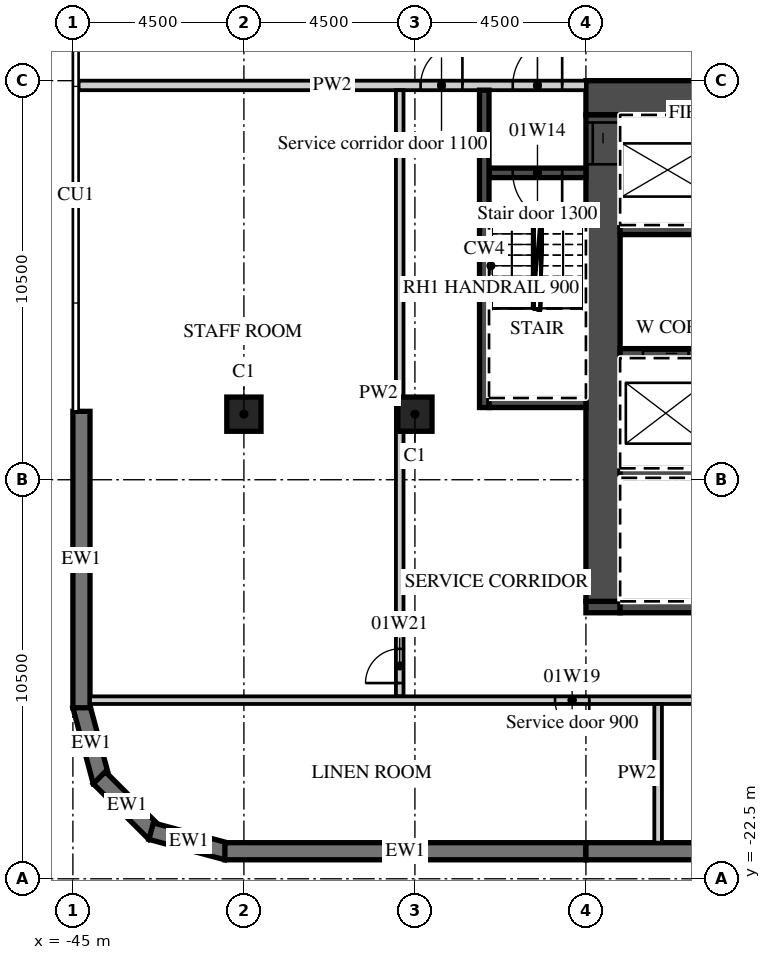
"""IFC4 building model, lengths in metres.
Left out: names, types, materials, properties, quantities, classifications, styles, units other than length and angle.
Written with IfcOpenShell. Run it as: python <this file> out.ifc"""

import sys

from ifc_helpers import new_model, si_unit, direction, frame, frame_2d, origin, origin_2d, place, context, subcontext, project, spatial, polyline, rectangle, outline, extrude, element, fill, save


model = new_model("IFC4")
c1 = context("Model", 3, precision=1e-05, world=origin(), true_north=direction((0.0, 1.0)))
c2 = subcontext(c1, "Body", "Model", "MODEL_VIEW")
j1 = project(units=[si_unit("LENGTHUNIT", "METRE"), si_unit("PLANEANGLEUNIT", "RADIAN")], contexts=[c1])
p1 = place(None, origin())
s1 = spatial("IfcSite", under=j1, at=p1, CompositionType="ELEMENT")
p2 = place(p1, origin())
s2 = spatial("IfcBuilding", under=s1, at=p2, CompositionType="ELEMENT")
p3 = place(p2, frame((0.0, 0.0, 11.0)))
s3 = spatial("IfcBuildingStorey", under=s2, at=p3, CompositionType="ELEMENT", Elevation=11.0)
for number, where, z_axis, x_axis in (
    (1, (-40.5, -10.275, 0.0), (0.0, 0.0, 1.0), (1.0, 0.0, 0.0)),
    (2, (-36.0, -10.275, 0.0), (0.0, 0.0, 1.0), (1.0, 0.0, 0.0)),
):
    element("IfcColumn", number, at=place(p3, frame(where, z_axis=z_axis, x_axis=x_axis)), inside=s3, PredefinedType="COLUMN", context=c2, shape_type="SweptSolid", body=[
        extrude(rectangle(XDim=0.9, YDim=0.9, at=origin_2d()), origin(), (0.0, 0.0, 1.0), 6.0),
    ])
p4 = place(p3, frame((-44.783, -17.942, 0.0), z_axis=(0.0, 0.0, 1.0), x_axis=(0.25881466832, -0.965926999034, 0.0)))
e3 = element("IfcWall", 3, at=p4, inside=s3, PredefinedType="SOLIDWALL", context=c2, shape_type="SweptSolid", body=[
    extrude(outline(polyline([(0.0, -0.225), (2.071, -0.225), (1.95, 0.225), (0.121, 0.225), (0.0, -0.225)])), origin(), (0.0, 0.0, 1.0), 5.55),
])
p5 = place(p3, frame((-44.305, -19.841, 0.0), z_axis=(0.0, 0.0, 1.0), x_axis=(0.707106781187, -0.707106781187, 0.0)))
e4 = element("IfcWall", 4, at=p5, inside=s3, PredefinedType="SOLIDWALL", context=c2, shape_type="SweptSolid", body=[
    extrude(outline(polyline([(0.0, -0.225), (2.071, -0.225), (1.95, 0.225), (0.121, 0.225), (0.0, -0.225)])), origin(), (0.0, 0.0, 1.0), 5.55),
])
p6 = place(p3, frame((-42.942, -21.247, 0.0), z_axis=(0.0, 0.0, 1.0), x_axis=(0.965926999034, -0.25881466832, 0.0)))
e5 = element("IfcWall", 5, at=p6, inside=s3, PredefinedType="SOLIDWALL", context=c2, shape_type="SweptSolid", body=[
    extrude(outline(polyline([(-0.0, -0.225), (2.07, -0.225), (1.95, 0.225), (0.12, 0.225), (-0.0, -0.225)])), origin(), (0.0, 0.0, 1.0), 5.55),
])
p7 = place(p3, frame((-41.0, -21.775, 0.0), z_axis=(0.0, 0.0, 1.0), x_axis=(1.0, 0.0, 0.0)))
e6 = element("IfcWall", 6, at=p7, inside=s3, PredefinedType="SOLIDWALL", context=c2, shape_type="SweptSolid", body=[
    extrude(rectangle(XDim=9.5, YDim=0.45, at=frame_2d((4.75, 0.0))), origin(), (0.0, 0.0, 1.0), 5.55),
])
p8 = place(p3, frame((-31.5, -21.775, 0.0), z_axis=(0.0, 0.0, 1.0), x_axis=(1.0, 0.0, 0.0)))
e7 = element("IfcWall", 7, at=p8, inside=s3, PredefinedType="SOLIDWALL", context=c2, shape_type="SweptSolid", body=[
    extrude(rectangle(XDim=18.0, YDim=0.45, at=frame_2d((9.0, 0.0))), origin(), (0.0, 0.0, 1.0), 5.55),
])
p9 = place(p3, frame((-44.775, -10.2, 0.0), z_axis=(0.0, 0.0, 1.0), x_axis=(0.0, -1.0, 0.0)))
e8 = element("IfcWall", 8, at=p9, inside=s3, PredefinedType="SOLIDWALL", context=c2, shape_type="SweptSolid", body=[
    extrude(rectangle(XDim=7.8, YDim=0.45, at=frame_2d((3.9, 0.0))), origin(), (0.0, 0.0, 1.0), 5.55),
])
p10 = place(p3, frame((-31.5, -1.95, 0.0), z_axis=(0.0, 0.0, 1.0), x_axis=(1.0, 0.0, 0.0)))
e9 = element("IfcWall", 9, at=p10, inside=s3, PredefinedType="SHEAR", context=c2, shape_type="SweptSolid", body=[
    extrude(rectangle(XDim=18.0, YDim=0.9, at=frame_2d((9.0, 0.0))), origin(), (0.0, 0.0, 1.0), 5.55),
])
p11 = place(p10, frame((14.725, 0.0, 0.0)))
e10 = element("IfcOpeningElement", 10, at=p11, cuts=e9, PredefinedType="OPENING", context=c2, shape_type="SweptSolid", body=[
    extrude(rectangle(XDim=1.8, YDim=2.1, at=frame_2d((0.9, 1.05))), frame((0.0, 0.46, 0.0), z_axis=(0.0, -1.0, 0.0), x_axis=(1.0, 0.0, 0.0)), (0.0, 0.0, 1.0), 0.92),
])
p12 = place(p3, frame((-31.5, -15.35, 0.0), z_axis=(0.0, 0.0, 1.0), x_axis=(1.0, 0.0, 0.0)))
e11 = element("IfcWall", 11, at=p12, inside=s3, PredefinedType="SHEAR", context=c2, shape_type="SweptSolid", body=[
    extrude(rectangle(XDim=0.9, YDim=0.3, at=frame_2d((0.45, 0.0))), origin(), (0.0, 0.0, 1.0), 5.55),
])
p13 = place(p3, frame((-30.6, -15.35, 0.0), z_axis=(0.0, 0.0, 1.0), x_axis=(1.0, 0.0, 0.0)))
e12 = element("IfcWall", 12, at=p13, inside=s3, PredefinedType="SHEAR", context=c2, shape_type="SweptSolid", body=[
    extrude(rectangle(XDim=10.3, YDim=0.3, at=frame_2d((5.15, 0.0))), origin(), (0.0, 0.0, 1.0), 5.55),
])
p14 = place(p13, frame((5.0, 0.0, 0.0)))
e13 = element("IfcOpeningElement", 13, at=p14, cuts=e12, PredefinedType="OPENING", context=c2, shape_type="SweptSolid", body=[
    extrude(rectangle(XDim=1.3, YDim=2.1, at=frame_2d((0.65, 1.05))), frame((0.0, 0.16, 0.0), z_axis=(0.0, -1.0, 0.0), x_axis=(1.0, 0.0, 0.0)), (0.0, 0.0, 1.0), 0.32),
])
p15 = place(p13, frame((7.9, 0.0, 0.0)))
e14 = element("IfcOpeningElement", 14, at=p15, cuts=e12, PredefinedType="OPENING", context=c2, shape_type="SweptSolid", body=[
    extrude(rectangle(XDim=0.9, YDim=2.1, at=frame_2d((0.45, 1.05))), frame((0.0, 0.16, 0.0), z_axis=(0.0, -1.0, 0.0), x_axis=(1.0, 0.0, 0.0)), (0.0, 0.0, 1.0), 0.32),
])
p16 = place(p3, frame((-31.05, -15.2, 0.0), z_axis=(0.0, 0.0, 1.0), x_axis=(0.0, 1.0, 0.0)))
e15 = element("IfcWall", 15, at=p16, inside=s3, PredefinedType="SHEAR", context=c2, shape_type="SweptSolid", body=[
    extrude(rectangle(XDim=12.8, YDim=0.9, at=frame_2d((6.4, 0.0))), origin(), (0.0, 0.0, 1.0), 5.55),
])
p17 = place(p16, frame((11.5, 0.0, 0.0)))
e16 = element("IfcOpeningElement", 16, at=p17, cuts=e15, PredefinedType="OPENING", context=c2, shape_type="SweptSolid", body=[
    extrude(rectangle(XDim=1.1, YDim=2.1, at=frame_2d((0.55, 1.05))), frame((0.0, 0.46, 0.0), z_axis=(0.0, -1.0, 0.0), x_axis=(1.0, 0.0, 0.0)), (0.0, 0.0, 1.0), 0.92),
])
p18 = place(p3, frame((-30.6, -5.425, 0.0), z_axis=(0.0, 0.0, 1.0), x_axis=(1.0, 0.0, 0.0)))
e17 = element("IfcWall", 17, at=p18, inside=s3, PredefinedType="SHEAR", context=c2, shape_type="SweptSolid", body=[
    extrude(rectangle(XDim=13.0, YDim=0.25, at=frame_2d((6.5, 0.0))), origin(), (0.0, 0.0, 1.0), 5.55),
])
p19 = place(p18, frame((3.325, 0.0, 0.0)))
e18 = element("IfcOpeningElement", 18, at=p19, cuts=e17, PredefinedType="OPENING", context=c2, shape_type="SweptSolid", body=[
    extrude(rectangle(XDim=1.2, YDim=2.1, at=frame_2d((0.6, 1.05))), frame((0.0, 0.135, 0.0), z_axis=(0.0, -1.0, 0.0), x_axis=(1.0, 0.0, 0.0)), (0.0, 0.0, 1.0), 0.27),
])
p20 = place(p18, frame((5.925, 0.0, 0.0)))
e19 = element("IfcOpeningElement", 19, at=p20, cuts=e17, PredefinedType="OPENING", context=c2, shape_type="SweptSolid", body=[
    extrude(rectangle(XDim=1.2, YDim=2.1, at=frame_2d((0.6, 1.05))), frame((0.0, 0.135, 0.0), z_axis=(0.0, -1.0, 0.0), x_axis=(1.0, 0.0, 0.0)), (0.0, 0.0, 1.0), 0.27),
])
p21 = place(p18, frame((8.525, 0.0, 0.0)))
e20 = element("IfcOpeningElement", 20, at=p21, cuts=e17, PredefinedType="OPENING", context=c2, shape_type="SweptSolid", body=[
    extrude(rectangle(XDim=1.2, YDim=2.1, at=frame_2d((0.6, 1.05))), frame((0.0, 0.135, 0.0), z_axis=(0.0, -1.0, 0.0), x_axis=(1.0, 0.0, 0.0)), (0.0, 0.0, 1.0), 0.27),
])
p22 = place(p18, frame((11.175, 0.0, 0.0)))
e21 = element("IfcOpeningElement", 21, at=p22, cuts=e17, PredefinedType="OPENING", context=c2, shape_type="SweptSolid", body=[
    extrude(rectangle(XDim=1.2, YDim=2.1, at=frame_2d((0.6, 1.05))), frame((0.0, 0.135, 0.0), z_axis=(0.0, -1.0, 0.0), x_axis=(1.0, 0.0, 0.0)), (0.0, 0.0, 1.0), 0.27),
])
p23 = place(p3, frame((-30.6, -8.675, 0.0), z_axis=(0.0, 0.0, 1.0), x_axis=(1.0, 0.0, 0.0)))
e22 = element("IfcWall", 22, at=p23, inside=s3, PredefinedType="SHEAR", context=c2, shape_type="SweptSolid", body=[
    extrude(rectangle(XDim=16.2, YDim=0.25, at=frame_2d((8.1, 0.0))), origin(), (0.0, 0.0, 1.0), 5.55),
])
p24 = place(p23, frame((0.6, 0.0, 0.0)))
e23 = element("IfcOpeningElement", 23, at=p24, cuts=e22, PredefinedType="OPENING", context=c2, shape_type="SweptSolid", body=[
    extrude(rectangle(XDim=1.2, YDim=2.1, at=frame_2d((0.6, 1.05))), frame((0.0, 0.135, 0.0), z_axis=(0.0, -1.0, 0.0), x_axis=(1.0, 0.0, 0.0)), (0.0, 0.0, 1.0), 0.27),
])
p25 = place(p23, frame((3.25, 0.0, 0.0)))
e24 = element("IfcOpeningElement", 24, at=p25, cuts=e22, PredefinedType="OPENING", context=c2, shape_type="SweptSolid", body=[
    extrude(rectangle(XDim=1.2, YDim=2.1, at=frame_2d((0.6, 1.05))), frame((0.0, 0.135, 0.0), z_axis=(0.0, -1.0, 0.0), x_axis=(1.0, 0.0, 0.0)), (0.0, 0.0, 1.0), 0.27),
])
p26 = place(p23, frame((5.9, 0.0, 0.0)))
e25 = element("IfcOpeningElement", 25, at=p26, cuts=e22, PredefinedType="OPENING", context=c2, shape_type="SweptSolid", body=[
    extrude(rectangle(XDim=1.2, YDim=2.1, at=frame_2d((0.6, 1.05))), frame((0.0, 0.135, 0.0), z_axis=(0.0, -1.0, 0.0), x_axis=(1.0, 0.0, 0.0)), (0.0, 0.0, 1.0), 0.27),
])
p27 = place(p23, frame((8.55, 0.0, 0.0)))
e26 = element("IfcOpeningElement", 26, at=p27, cuts=e22, PredefinedType="OPENING", context=c2, shape_type="SweptSolid", body=[
    extrude(rectangle(XDim=1.2, YDim=2.1, at=frame_2d((0.6, 1.05))), frame((0.0, 0.135, 0.0), z_axis=(0.0, -1.0, 0.0), x_axis=(1.0, 0.0, 0.0)), (0.0, 0.0, 1.0), 0.27),
])
p28 = place(p23, frame((11.2, 0.0, 0.0)))
e27 = element("IfcOpeningElement", 27, at=p28, cuts=e22, PredefinedType="OPENING", context=c2, shape_type="SweptSolid", body=[
    extrude(rectangle(XDim=1.2, YDim=2.1, at=frame_2d((0.6, 1.05))), frame((0.0, 0.135, 0.0), z_axis=(0.0, -1.0, 0.0), x_axis=(1.0, 0.0, 0.0)), (0.0, 0.0, 1.0), 0.27),
])
p29 = place(p23, frame((14.25, 0.0, 0.0)))
e28 = element("IfcOpeningElement", 28, at=p29, cuts=e22, PredefinedType="OPENING", context=c2, shape_type="SweptSolid", body=[
    extrude(rectangle(XDim=1.3, YDim=2.1, at=frame_2d((0.65, 1.05))), frame((0.0, 0.135, 0.0), z_axis=(0.0, -1.0, 0.0), x_axis=(1.0, 0.0, 0.0)), (0.0, 0.0, 1.0), 0.27),
])
p30 = place(p3, frame((-30.6, -11.825, 0.0), z_axis=(0.0, 0.0, 1.0), x_axis=(1.0, 0.0, 0.0)))
e29 = element("IfcWall", 29, at=p30, inside=s3, PredefinedType="SHEAR", context=c2, shape_type="SweptSolid", body=[
    extrude(rectangle(XDim=13.25, YDim=0.25, at=frame_2d((6.625, 0.0))), origin(), (0.0, 0.0, 1.0), 5.55),
])
p31 = place(p3, frame((-44.85, -1.625, 0.0), z_axis=(0.0, 0.0, 1.0), x_axis=(1.0, 0.0, 0.0)))
e30 = element("IfcWall", 30, at=p31, inside=s3, PredefinedType="PARTITIONING", context=c2, shape_type="SweptSolid", body=[
    extrude(rectangle(XDim=13.35, YDim=0.25, at=frame_2d((6.675, 0.0))), origin(), (0.0, 0.0, 1.0), 5.55),
])
p32 = place(p31, frame((11.425, 0.0, 0.0)))
e31 = element("IfcOpeningElement", 31, at=p32, cuts=e30, PredefinedType="OPENING", context=c2, shape_type="SweptSolid", body=[
    extrude(rectangle(XDim=1.3, YDim=2.1, at=frame_2d((0.65, 1.05))), frame((0.0, 0.135, 0.0), z_axis=(0.0, -1.0, 0.0), x_axis=(1.0, 0.0, 0.0)), (0.0, 0.0, 1.0), 0.27),
])
p33 = place(p31, frame((9.0, 0.0, 0.0)))
e32 = element("IfcOpeningElement", 32, at=p33, cuts=e30, PredefinedType="OPENING", context=c2, shape_type="SweptSolid", body=[
    extrude(rectangle(XDim=1.1, YDim=2.1, at=frame_2d((0.55, 1.05))), frame((0.0, 0.135, 0.0), z_axis=(0.0, -1.0, 0.0), x_axis=(1.0, 0.0, 0.0)), (0.0, 0.0, 1.0), 0.27),
])
p34 = place(p3, frame((-34.05, -3.925, 0.0), z_axis=(0.0, 0.0, 1.0), x_axis=(1.0, 0.0, 0.0)))
e33 = element("IfcWall", 33, at=p34, inside=s3, PredefinedType="SHEAR", context=c2, shape_type="SweptSolid", body=[
    extrude(rectangle(XDim=2.55, YDim=0.25, at=frame_2d((1.275, 0.0))), origin(), (0.0, 0.0, 1.0), 5.55),
])
p35 = place(p34, frame((0.625, 0.0, 0.0)))
e34 = element("IfcOpeningElement", 34, at=p35, cuts=e33, PredefinedType="OPENING", context=c2, shape_type="SweptSolid", body=[
    extrude(rectangle(XDim=1.3, YDim=2.1, at=frame_2d((0.65, 1.05))), frame((0.0, 0.135, 0.0), z_axis=(0.0, -1.0, 0.0), x_axis=(1.0, 0.0, 0.0)), (0.0, 0.0, 1.0), 0.27),
])
p36 = place(p3, frame((-34.175, -10.1, 0.0), z_axis=(0.0, 0.0, 1.0), x_axis=(0.0, 1.0, 0.0)))
e35 = element("IfcWall", 35, at=p36, inside=s3, PredefinedType="SHEAR", context=c2, shape_type="SweptSolid", body=[
    extrude(rectangle(XDim=8.35, YDim=0.25, at=frame_2d((4.175, 0.0))), origin(), (0.0, 0.0, 1.0), 5.55),
])
p37 = place(p3, frame((-34.05, -9.975, 0.0), z_axis=(0.0, 0.0, 1.0), x_axis=(1.0, 0.0, 0.0)))
e36 = element("IfcWall", 36, at=p37, inside=s3, PredefinedType="SHEAR", context=c2, shape_type="SweptSolid", body=[
    extrude(rectangle(XDim=2.55, YDim=0.25, at=frame_2d((1.275, 0.0))), origin(), (0.0, 0.0, 1.0), 5.55),
])
p38 = place(p3, frame((-36.4, -17.7, 0.0), z_axis=(0.0, 0.0, 1.0), x_axis=(0.0, 1.0, 0.0)))
e37 = element("IfcWall", 37, at=p38, inside=s3, PredefinedType="PARTITIONING", context=c2, shape_type="SweptSolid", body=[
    extrude(rectangle(XDim=15.95, YDim=0.2, at=frame_2d((7.975, 0.0))), origin(), (0.0, 0.0, 1.0), 5.55),
])
p39 = place(p38, frame((0.35, 0.0, 0.0)))
e38 = element("IfcOpeningElement", 38, at=p39, cuts=e37, PredefinedType="OPENING", context=c2, shape_type="SweptSolid", body=[
    extrude(rectangle(XDim=0.9, YDim=2.1, at=frame_2d((0.45, 1.05))), frame((0.0, 0.11, 0.0), z_axis=(0.0, -1.0, 0.0), x_axis=(1.0, 0.0, 0.0)), (0.0, 0.0, 1.0), 0.22),
])
p40 = place(p3, frame((-44.55, -17.8, 0.0), z_axis=(0.0, 0.0, 1.0), x_axis=(1.0, 0.0, 0.0)))
e39 = element("IfcWall", 39, at=p40, inside=s3, PredefinedType="PARTITIONING", context=c2, shape_type="SweptSolid", body=[
    extrude(rectangle(XDim=30.95, YDim=0.2, at=frame_2d((15.475, 0.0))), origin(), (0.0, 0.0, 1.0), 5.55),
])
p41 = place(p40, frame((12.238, 0.0, 0.0)))
e40 = element("IfcOpeningElement", 40, at=p41, cuts=e39, PredefinedType="OPENING", context=c2, shape_type="SweptSolid", body=[
    extrude(rectangle(XDim=0.9, YDim=2.1, at=frame_2d((0.45, 1.05))), frame((0.0, 0.11, 0.0), z_axis=(0.0, -1.0, 0.0), x_axis=(1.0, 0.0, 0.0)), (0.0, 0.0, 1.0), 0.22),
])
p42 = place(p40, frame((20.538, 0.0, 0.0)))
e41 = element("IfcOpeningElement", 41, at=p42, cuts=e39, PredefinedType="OPENING", context=c2, shape_type="SweptSolid", body=[
    extrude(rectangle(XDim=0.9, YDim=2.1, at=frame_2d((0.45, 1.05))), frame((0.0, 0.11, 0.0), z_axis=(0.0, -1.0, 0.0), x_axis=(1.0, 0.0, 0.0)), (0.0, 0.0, 1.0), 0.22),
])
p43 = place(p3, frame((-29.6, -21.55, 0.0), z_axis=(0.0, 0.0, 1.0), x_axis=(0.0, 1.0, 0.0)))
e42 = element("IfcWall", 42, at=p43, inside=s3, PredefinedType="PARTITIONING", context=c2, shape_type="SweptSolid", body=[
    extrude(rectangle(XDim=3.65, YDim=0.2, at=frame_2d((1.825, 0.0))), origin(), (0.0, 0.0, 1.0), 5.55),
])
p44 = place(p24, origin())
e43 = element("IfcDoor", 43, at=p44, inside=s3, OperationType="SLIDING_TO_LEFT", PredefinedType="DOOR", context=c2, shape_type="SweptSolid", body=[
    extrude(rectangle(XDim=1.2, YDim=2.1, at=frame_2d((0.6, 1.05))), frame((0.0, 0.025, 0.0), z_axis=(0.0, -1.0, 0.0), x_axis=(1.0, 0.0, 0.0)), (0.0, 0.0, 1.0), 0.05),
])
fill(e23, e43)
p45 = place(p17, origin())
e44 = element("IfcDoor", 44, at=p45, inside=s3, OperationType="SLIDING_TO_RIGHT", PredefinedType="DOOR", context=c2, shape_type="SweptSolid", body=[
    extrude(rectangle(XDim=1.1, YDim=2.1, at=frame_2d((0.55, 1.05))), frame((0.0, 0.025, 0.0), z_axis=(0.0, -1.0, 0.0), x_axis=(1.0, 0.0, 0.0)), (0.0, 0.0, 1.0), 0.05),
])
fill(e16, e44)
p46 = place(p32, origin())
e45 = element("IfcDoor", 45, at=p46, inside=s3, OperationType="SINGLE_SWING_RIGHT", PredefinedType="DOOR", context=c2, shape_type="SweptSolid", body=[
    extrude(rectangle(XDim=1.3, YDim=2.1, at=frame_2d((0.65, 1.05))), frame((0.0, 0.025, 0.0), z_axis=(0.0, -1.0, 0.0), x_axis=(1.0, 0.0, 0.0)), (0.0, 0.0, 1.0), 0.05),
])
fill(e31, e45)
p47 = place(p35, origin())
e46 = element("IfcDoor", 46, at=p47, inside=s3, OperationType="SINGLE_SWING_RIGHT", PredefinedType="DOOR", context=c2, shape_type="SweptSolid", body=[
    extrude(rectangle(XDim=1.3, YDim=2.1, at=frame_2d((0.65, 1.05))), frame((0.0, 0.025, 0.0), z_axis=(0.0, -1.0, 0.0), x_axis=(1.0, 0.0, 0.0)), (0.0, 0.0, 1.0), 0.05),
])
fill(e34, e46)
p48 = place(p33, origin())
e47 = element("IfcDoor", 47, at=p48, inside=s3, OperationType="SINGLE_SWING_RIGHT", PredefinedType="DOOR", context=c2, shape_type="SweptSolid", body=[
    extrude(rectangle(XDim=1.1, YDim=2.1, at=frame_2d((0.55, 1.05))), frame((0.0, 0.025, 0.0), z_axis=(0.0, -1.0, 0.0), x_axis=(1.0, 0.0, 0.0)), (0.0, 0.0, 1.0), 0.05),
])
fill(e32, e47)
p49 = place(p41, origin())
e48 = element("IfcDoor", 48, at=p49, inside=s3, OperationType="SINGLE_SWING_RIGHT", PredefinedType="DOOR", context=c2, shape_type="SweptSolid", body=[
    extrude(rectangle(XDim=0.9, YDim=2.1, at=frame_2d((0.45, 1.05))), frame((0.0, 0.025, 0.0), z_axis=(0.0, -1.0, 0.0), x_axis=(1.0, 0.0, 0.0)), (0.0, 0.0, 1.0), 0.05),
])
fill(e40, e48)
p50 = place(p39, origin())
e49 = element("IfcDoor", 49, at=p50, inside=s3, OperationType="SINGLE_SWING_LEFT", PredefinedType="DOOR", context=c2, shape_type="SweptSolid", body=[
    extrude(rectangle(XDim=0.9, YDim=2.1, at=frame_2d((0.45, 1.05))), frame((0.0, 0.025, 0.0), z_axis=(0.0, -1.0, 0.0), x_axis=(1.0, 0.0, 0.0)), (0.0, 0.0, 1.0), 0.05),
])
fill(e38, e49)
save(model, sys.argv[1])
